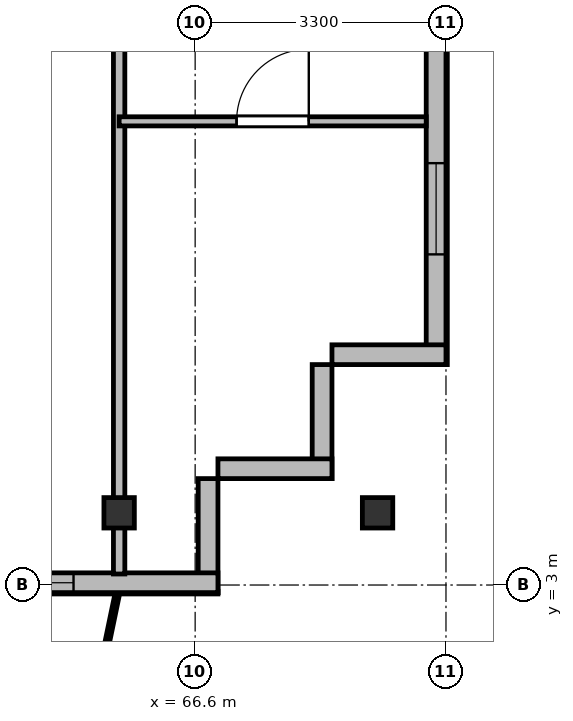
"""IFC4 building model, lengths in metres.
Left out: names, types, materials, properties, quantities, classifications, styles, units other than length and angle.
Written with IfcOpenShell. Run it as: python <this file> out.ifc"""

import sys

from ifc_helpers import new_model, si_unit, direction, frame, frame_2d, origin, origin_2d, place, context, subcontext, project, spatial, rectangle, i_section, extrude, source, transform, mapped, element, fill, save


model = new_model("IFC4")
c1 = context("Model", 3, precision=1e-05, world=origin(), true_north=direction((0.0, 1.0)))
c2 = subcontext(c1, "Body", "Model", "MODEL_VIEW")
j1 = project(units=[si_unit("LENGTHUNIT", "METRE"), si_unit("PLANEANGLEUNIT", "RADIAN")], contexts=[c1])
p1 = place(None, origin())
s1 = spatial("IfcSite", under=j1, at=p1, CompositionType="ELEMENT")
p2 = place(p1, origin())
s2 = spatial("IfcBuilding", under=s1, at=p2, CompositionType="ELEMENT")
p3 = place(p2, frame((0.0, 0.0, 99.7)))
s3 = spatial("IfcBuildingStorey", under=s2, at=p3, CompositionType="ELEMENT", Elevation=99.7)
m1 = source(origin(), c2, "Body", "SweptSolid", [
    extrude(i_section(OverallWidth=0.4, OverallDepth=0.4, WebThickness=0.022, FlangeThickness=0.035, at=origin_2d()), origin(), (0.0, 0.0, 1.0), 3.6),
])
for number, where, z_axis, x_axis in (
    (1, (65.6, 3.95, 0.0), (0.0, 0.0, 1.0), (1.0, 0.0, 0.0)),
    (2, (69.0, 3.95, 0.0), (0.0, 0.0, 1.0), (1.0, 0.0, 0.0)),
):
    element("IfcColumn", number, at=place(p3, frame(where, z_axis=z_axis, x_axis=x_axis)), inside=s3, PredefinedType="COLUMN", context=c2, shape_type="MappedRepresentation", body=[
        mapped(m1, transform((0.0, 0.0, 0.0), x_axis=(1.0, 0.0, 0.0), y_axis=(0.0, 1.0, 0.0), z_axis=(0.0, 0.0, 1.0), scale=1.0)),
    ])
p4 = place(p3, frame((69.77, 45.5, 0.0), z_axis=(0.0, 0.0, 1.0), x_axis=(0.0, -1.0, 0.0)))
e3 = element("IfcWall", 3, at=p4, inside=s3, PredefinedType="SOLIDWALL", context=c2, shape_type="SweptSolid", body=[
    extrude(rectangle(XDim=39.6, YDim=0.26, at=frame_2d((19.8, 0.0))), origin(), (0.0, 0.0, 1.0), 3.34),
])
p5 = place(p4, frame((36.95, 0.0, 0.92)))
e4 = element("IfcOpeningElement", 4, at=p5, cuts=e3, PredefinedType="OPENING", context=c2, shape_type="SweptSolid", body=[
    extrude(rectangle(XDim=1.2, YDim=1.65, at=frame_2d((0.6, 0.825))), frame((0.0, 0.14, 0.0), z_axis=(0.0, -1.0, 0.0), x_axis=(1.0, 0.0, 0.0)), (0.0, 0.0, 1.0), 0.28),
])
p6 = place(p4, frame((32.9, 0.0, 0.92)))
e5 = element("IfcOpeningElement", 5, at=p6, cuts=e3, PredefinedType="OPENING", context=c2, shape_type="SweptSolid", body=[
    extrude(rectangle(XDim=2.4, YDim=2.1, at=frame_2d((1.2, 1.05))), frame((0.0, 0.14, 0.0), z_axis=(0.0, -1.0, 0.0), x_axis=(1.0, 0.0, 0.0)), (0.0, 0.0, 1.0), 0.28),
])
p7 = place(p4, frame((28.7, 0.0, 0.92)))
e6 = element("IfcOpeningElement", 6, at=p7, cuts=e3, PredefinedType="OPENING", context=c2, shape_type="SweptSolid", body=[
    extrude(rectangle(XDim=2.4, YDim=2.1, at=frame_2d((1.2, 1.05))), frame((0.0, 0.14, 0.0), z_axis=(0.0, -1.0, 0.0), x_axis=(1.0, 0.0, 0.0)), (0.0, 0.0, 1.0), 0.28),
])
p8 = place(p4, frame((21.5, 0.0, 0.92)))
e7 = element("IfcOpeningElement", 7, at=p8, cuts=e3, PredefinedType="OPENING", context=c2, shape_type="SweptSolid", body=[
    extrude(rectangle(XDim=2.4, YDim=2.1, at=frame_2d((1.2, 1.05))), frame((0.0, 0.14, 0.0), z_axis=(0.0, -1.0, 0.0), x_axis=(1.0, 0.0, 0.0)), (0.0, 0.0, 1.0), 0.28),
])
p9 = place(p4, frame((7.5, 0.0, 0.92)))
e8 = element("IfcOpeningElement", 8, at=p9, cuts=e3, PredefinedType="OPENING", context=c2, shape_type="SweptSolid", body=[
    extrude(rectangle(XDim=2.4, YDim=2.1, at=frame_2d((1.2, 1.05))), frame((0.0, 0.14, 0.0), z_axis=(0.0, -1.0, 0.0), x_axis=(1.0, 0.0, 0.0)), (0.0, 0.0, 1.0), 0.28),
])
p10 = place(p4, frame((4.5, 0.0, 0.92)))
e9 = element("IfcOpeningElement", 9, at=p10, cuts=e3, PredefinedType="OPENING", context=c2, shape_type="SweptSolid", body=[
    extrude(rectangle(XDim=1.2, YDim=1.65, at=frame_2d((0.6, 0.825))), frame((0.0, 0.14, 0.0), z_axis=(0.0, -1.0, 0.0), x_axis=(1.0, 0.0, 0.0)), (0.0, 0.0, 1.0), 0.28),
])
p11 = place(p4, frame((1.15, 0.0, 0.92)))
e10 = element("IfcOpeningElement", 10, at=p11, cuts=e3, PredefinedType="OPENING", context=c2, shape_type="SweptSolid", body=[
    extrude(rectangle(XDim=1.2, YDim=1.65, at=frame_2d((0.6, 0.825))), frame((0.0, 0.14, 0.0), z_axis=(0.0, -1.0, 0.0), x_axis=(1.0, 0.0, 0.0)), (0.0, 0.0, 1.0), 0.28),
])
p12 = place(p3, frame((69.9, 6.03, 0.0), z_axis=(0.0, 0.0, 1.0), x_axis=(-1.0, 0.0, 0.0)))
e11 = element("IfcWall", 11, at=p12, inside=s3, PredefinedType="SOLIDWALL", context=c2, shape_type="SweptSolid", body=[
    extrude(rectangle(XDim=1.5, YDim=0.26, at=frame_2d((0.75, 0.0))), origin(), (0.0, 0.0, 1.0), 2.84),
])
for number, where, z_axis, x_axis in (
    (12, (68.27, 5.9, 0.0), (0.0, 0.0, 1.0), (0.0, -1.0, 0.0)),
    (13, (68.4, 4.53, 0.0), (0.0, 0.0, 1.0), (-1.0, 0.0, 0.0)),
):
    element("IfcWall", number, at=place(p3, frame(where, z_axis=z_axis, x_axis=x_axis)), inside=s3, PredefinedType="SOLIDWALL", context=c2, shape_type="SweptSolid", body=[
        extrude(rectangle(XDim=1.5, YDim=0.26, at=frame_2d((0.75, 0.0))), origin(), (0.0, 0.0, 1.0), 3.34),
    ])
p13 = place(p3, frame((66.77, 4.4, 0.0), z_axis=(0.0, 0.0, 1.0), x_axis=(0.0, -1.0, 0.0)))
e14 = element("IfcWall", 14, at=p13, inside=s3, PredefinedType="SOLIDWALL", context=c2, shape_type="SweptSolid", body=[
    extrude(rectangle(XDim=1.5, YDim=0.26, at=frame_2d((0.75, 0.0))), origin(), (0.0, 0.0, 1.0), 2.752),
])
p14 = place(p3, frame((66.9, 3.03, 0.0), z_axis=(0.0, 0.0, 1.0), x_axis=(-1.0, 0.0, 0.0)))
e15 = element("IfcWall", 15, at=p14, inside=s3, PredefinedType="SOLIDWALL", context=c2, shape_type="SweptSolid", body=[
    extrude(rectangle(XDim=59.4, YDim=0.26, at=frame_2d((29.7, 0.0))), origin(), (0.0, 0.0, 1.0), 3.34),
])
p15 = place(p14, frame((1.9, 0.0, 0.9)))
e16 = element("IfcOpeningElement", 16, at=p15, cuts=e15, PredefinedType="OPENING", context=c2, shape_type="SweptSolid", body=[
    extrude(rectangle(XDim=2.2, YDim=1.8, at=frame_2d((1.1, 0.9))), frame((0.0, 0.14, 0.0), z_axis=(0.0, -1.0, 0.0), x_axis=(1.0, 0.0, 0.0)), (0.0, 0.0, 1.0), 0.28),
])
p16 = place(p14, frame((5.65, 0.0, 0.9)))
e17 = element("IfcOpeningElement", 17, at=p16, cuts=e15, PredefinedType="OPENING", context=c2, shape_type="SweptSolid", body=[
    extrude(rectangle(XDim=1.5, YDim=1.75, at=frame_2d((0.75, 0.875))), frame((0.0, 0.14, 0.0), z_axis=(0.0, -1.0, 0.0), x_axis=(1.0, 0.0, 0.0)), (0.0, 0.0, 1.0), 0.28),
])
p17 = place(p14, frame((8.4, 0.0, 0.9)))
e18 = element("IfcOpeningElement", 18, at=p17, cuts=e15, PredefinedType="OPENING", context=c2, shape_type="SweptSolid", body=[
    extrude(rectangle(XDim=2.0, YDim=1.95, at=frame_2d((1.0, 0.975))), frame((0.0, 0.14, 0.0), z_axis=(0.0, -1.0, 0.0), x_axis=(1.0, 0.0, 0.0)), (0.0, 0.0, 1.0), 0.28),
])
p18 = place(p14, frame((11.175, 0.0, 0.9)))
e19 = element("IfcOpeningElement", 19, at=p18, cuts=e15, PredefinedType="OPENING", context=c2, shape_type="SweptSolid", body=[
    extrude(rectangle(XDim=1.65, YDim=1.85, at=frame_2d((0.825, 0.925))), frame((0.0, 0.14, 0.0), z_axis=(0.0, -1.0, 0.0), x_axis=(1.0, 0.0, 0.0)), (0.0, 0.0, 1.0), 0.28),
])
p19 = place(p14, frame((13.7, 0.0, 0.9)))
e20 = element("IfcOpeningElement", 20, at=p19, cuts=e15, PredefinedType="OPENING", context=c2, shape_type="SweptSolid", body=[
    extrude(rectangle(XDim=1.8, YDim=1.8, at=frame_2d((0.9, 0.9))), frame((0.0, 0.14, 0.0), z_axis=(0.0, -1.0, 0.0), x_axis=(1.0, 0.0, 0.0)), (0.0, 0.0, 1.0), 0.28),
])
p20 = place(p14, frame((16.5, 0.0, 0.9)))
e21 = element("IfcOpeningElement", 21, at=p20, cuts=e15, PredefinedType="OPENING", context=c2, shape_type="SweptSolid", body=[
    extrude(rectangle(XDim=2.2, YDim=1.8, at=frame_2d((1.1, 0.9))), frame((0.0, 0.14, 0.0), z_axis=(0.0, -1.0, 0.0), x_axis=(1.0, 0.0, 0.0)), (0.0, 0.0, 1.0), 0.28),
])
p21 = place(p14, frame((20.227, 0.0, 0.0)))
e22 = element("IfcOpeningElement", 22, at=p21, cuts=e15, PredefinedType="OPENING", context=c2, shape_type="SweptSolid", body=[
    extrude(rectangle(XDim=1.2, YDim=2.2, at=frame_2d((0.6, 1.1))), frame((0.0, 0.14, 0.0), z_axis=(0.0, -1.0, 0.0), x_axis=(1.0, 0.0, 0.0)), (0.0, 0.0, 1.0), 0.28),
])
p22 = place(p14, frame((28.7, 0.0, 0.9)))
e23 = element("IfcOpeningElement", 23, at=p22, cuts=e15, PredefinedType="OPENING", context=c2, shape_type="SweptSolid", body=[
    extrude(rectangle(XDim=2.0, YDim=1.95, at=frame_2d((1.0, 0.975))), frame((0.0, 0.14, 0.0), z_axis=(0.0, -1.0, 0.0), x_axis=(1.0, 0.0, 0.0)), (0.0, 0.0, 1.0), 0.28),
])
p23 = place(p14, frame((36.675, 0.0, 0.9)))
e24 = element("IfcOpeningElement", 24, at=p23, cuts=e15, PredefinedType="OPENING", context=c2, shape_type="SweptSolid", body=[
    extrude(rectangle(XDim=1.65, YDim=1.85, at=frame_2d((0.825, 0.925))), frame((0.0, 0.14, 0.0), z_axis=(0.0, -1.0, 0.0), x_axis=(1.0, 0.0, 0.0)), (0.0, 0.0, 1.0), 0.28),
])
p24 = place(p14, frame((39.0, 0.0, 0.9)))
e25 = element("IfcOpeningElement", 25, at=p24, cuts=e15, PredefinedType="OPENING", context=c2, shape_type="SweptSolid", body=[
    extrude(rectangle(XDim=1.8, YDim=1.8, at=frame_2d((0.9, 0.9))), frame((0.0, 0.14, 0.0), z_axis=(0.0, -1.0, 0.0), x_axis=(1.0, 0.0, 0.0)), (0.0, 0.0, 1.0), 0.28),
])
p25 = place(p14, frame((41.55, 0.0, 0.9)))
e26 = element("IfcOpeningElement", 26, at=p25, cuts=e15, PredefinedType="OPENING", context=c2, shape_type="SweptSolid", body=[
    extrude(rectangle(XDim=1.5, YDim=1.75, at=frame_2d((0.75, 0.875))), frame((0.0, 0.14, 0.0), z_axis=(0.0, -1.0, 0.0), x_axis=(1.0, 0.0, 0.0)), (0.0, 0.0, 1.0), 0.28),
])
p26 = place(p14, frame((45.36, 0.0, 0.0)))
e27 = element("IfcOpeningElement", 27, at=p26, cuts=e15, PredefinedType="OPENING", context=c2, shape_type="SweptSolid", body=[
    extrude(rectangle(XDim=1.2, YDim=2.2, at=frame_2d((0.6, 1.1))), frame((0.0, 0.14, 0.0), z_axis=(0.0, -1.0, 0.0), x_axis=(1.0, 0.0, 0.0)), (0.0, 0.0, 1.0), 0.28),
])
p27 = place(p14, frame((48.3, 0.0, 0.9)))
e28 = element("IfcOpeningElement", 28, at=p27, cuts=e15, PredefinedType="OPENING", context=c2, shape_type="SweptSolid", body=[
    extrude(rectangle(XDim=2.0, YDim=1.95, at=frame_2d((1.0, 0.975))), frame((0.0, 0.14, 0.0), z_axis=(0.0, -1.0, 0.0), x_axis=(1.0, 0.0, 0.0)), (0.0, 0.0, 1.0), 0.28),
])
p28 = place(p14, frame((52.175, 0.0, 0.9)))
e29 = element("IfcOpeningElement", 29, at=p28, cuts=e15, PredefinedType="OPENING", context=c2, shape_type="SweptSolid", body=[
    extrude(rectangle(XDim=1.65, YDim=1.85, at=frame_2d((0.825, 0.925))), frame((0.0, 0.14, 0.0), z_axis=(0.0, -1.0, 0.0), x_axis=(1.0, 0.0, 0.0)), (0.0, 0.0, 1.0), 0.28),
])
p29 = place(p14, frame((55.5, 0.0, 0.9)))
e30 = element("IfcOpeningElement", 30, at=p29, cuts=e15, PredefinedType="OPENING", context=c2, shape_type="SweptSolid", body=[
    extrude(rectangle(XDim=1.8, YDim=1.8, at=frame_2d((0.9, 0.9))), frame((0.0, 0.14, 0.0), z_axis=(0.0, -1.0, 0.0), x_axis=(1.0, 0.0, 0.0)), (0.0, 0.0, 1.0), 0.28),
])
p30 = place(p3, frame((65.6, 3.145, 0.0), z_axis=(0.0, 0.0, 1.0), x_axis=(0.0, 1.0, 0.0)))
e31 = element("IfcWall", 31, at=p30, inside=s3, PredefinedType="PARTITIONING", context=c2, shape_type="SweptSolid", body=[
    extrude(rectangle(XDim=24.455, YDim=0.15, at=frame_2d((12.228, 0.0))), origin(), (0.0, 0.0, 1.0), 2.84),
])
p31 = place(p3, frame((65.6, 9.1, 0.0), z_axis=(0.0, 0.0, 1.0), x_axis=(1.0, 0.0, 0.0)))
e32 = element("IfcWall", 32, at=p31, inside=s3, PredefinedType="PARTITIONING", context=c2, shape_type="SweptSolid", body=[
    extrude(rectangle(XDim=4.04, YDim=0.12, at=frame_2d((2.02, 0.0))), origin(), (0.0, 0.0, 1.0), 2.84),
])
p32 = place(p31, frame((1.545, 0.0, 0.0)))
e33 = element("IfcOpeningElement", 33, at=p32, cuts=e32, PredefinedType="OPENING", context=c2, shape_type="SweptSolid", body=[
    extrude(rectangle(XDim=0.95, YDim=2.15, at=frame_2d((0.475, 1.075))), frame((0.0, 0.07, 0.0), z_axis=(0.0, -1.0, 0.0), x_axis=(1.0, 0.0, 0.0)), (0.0, 0.0, 1.0), 0.14),
])
m2 = source(origin(), c2, "Body", "SweptSolid", [
    extrude(rectangle(XDim=1.2, YDim=1.65, at=frame_2d((0.6, 0.825))), frame((0.0, 0.03, 0.0), z_axis=(0.0, -1.0, 0.0), x_axis=(1.0, 0.0, 0.0)), (0.0, 0.0, 1.0), 0.06),
])
p33 = place(p5, origin())
e34 = element("IfcWindow", 34, at=p33, inside=s3, PartitioningType="SINGLE_PANEL", PredefinedType="WINDOW", context=c2, shape_type="MappedRepresentation", body=[
    mapped(m2, transform((0.0, 0.0, 0.0), x_axis=(1.0, 0.0, 0.0), y_axis=(0.0, 1.0, 0.0), z_axis=(0.0, 0.0, 1.0), scale=1.0)),
])
fill(e4, e34)
m3 = source(origin(), c2, "Body", "SweptSolid", [
    extrude(rectangle(XDim=2.2, YDim=1.8, at=frame_2d((1.1, 0.9))), frame((0.0, 0.03, 0.0), z_axis=(0.0, -1.0, 0.0), x_axis=(1.0, 0.0, 0.0)), (0.0, 0.0, 1.0), 0.06),
])
p34 = place(p15, origin())
e35 = element("IfcWindow", 35, at=p34, inside=s3, PartitioningType="SINGLE_PANEL", PredefinedType="WINDOW", context=c2, shape_type="MappedRepresentation", body=[
    mapped(m3, transform((0.0, 0.0, 0.0), x_axis=(1.0, 0.0, 0.0), y_axis=(0.0, 1.0, 0.0), z_axis=(0.0, 0.0, 1.0), scale=1.0)),
])
fill(e16, e35)
m4 = source(origin(), c2, "Body", "SweptSolid", [
    extrude(rectangle(XDim=0.95, YDim=2.15, at=frame_2d((0.475, 1.075))), frame((0.0, 0.025, 0.0), z_axis=(0.0, -1.0, 0.0), x_axis=(1.0, 0.0, 0.0)), (0.0, 0.0, 1.0), 0.05),
])
p35 = place(p32, origin())
e36 = element("IfcDoor", 36, at=p35, inside=s3, OperationType="SINGLE_SWING_RIGHT", PredefinedType="DOOR", context=c2, shape_type="MappedRepresentation", body=[
    mapped(m4, transform((0.0, 0.0, 0.0), x_axis=(1.0, 0.0, 0.0), y_axis=(0.0, 1.0, 0.0), z_axis=(0.0, 0.0, 1.0), scale=1.0)),
])
fill(e33, e36)
save(model, sys.argv[1])
